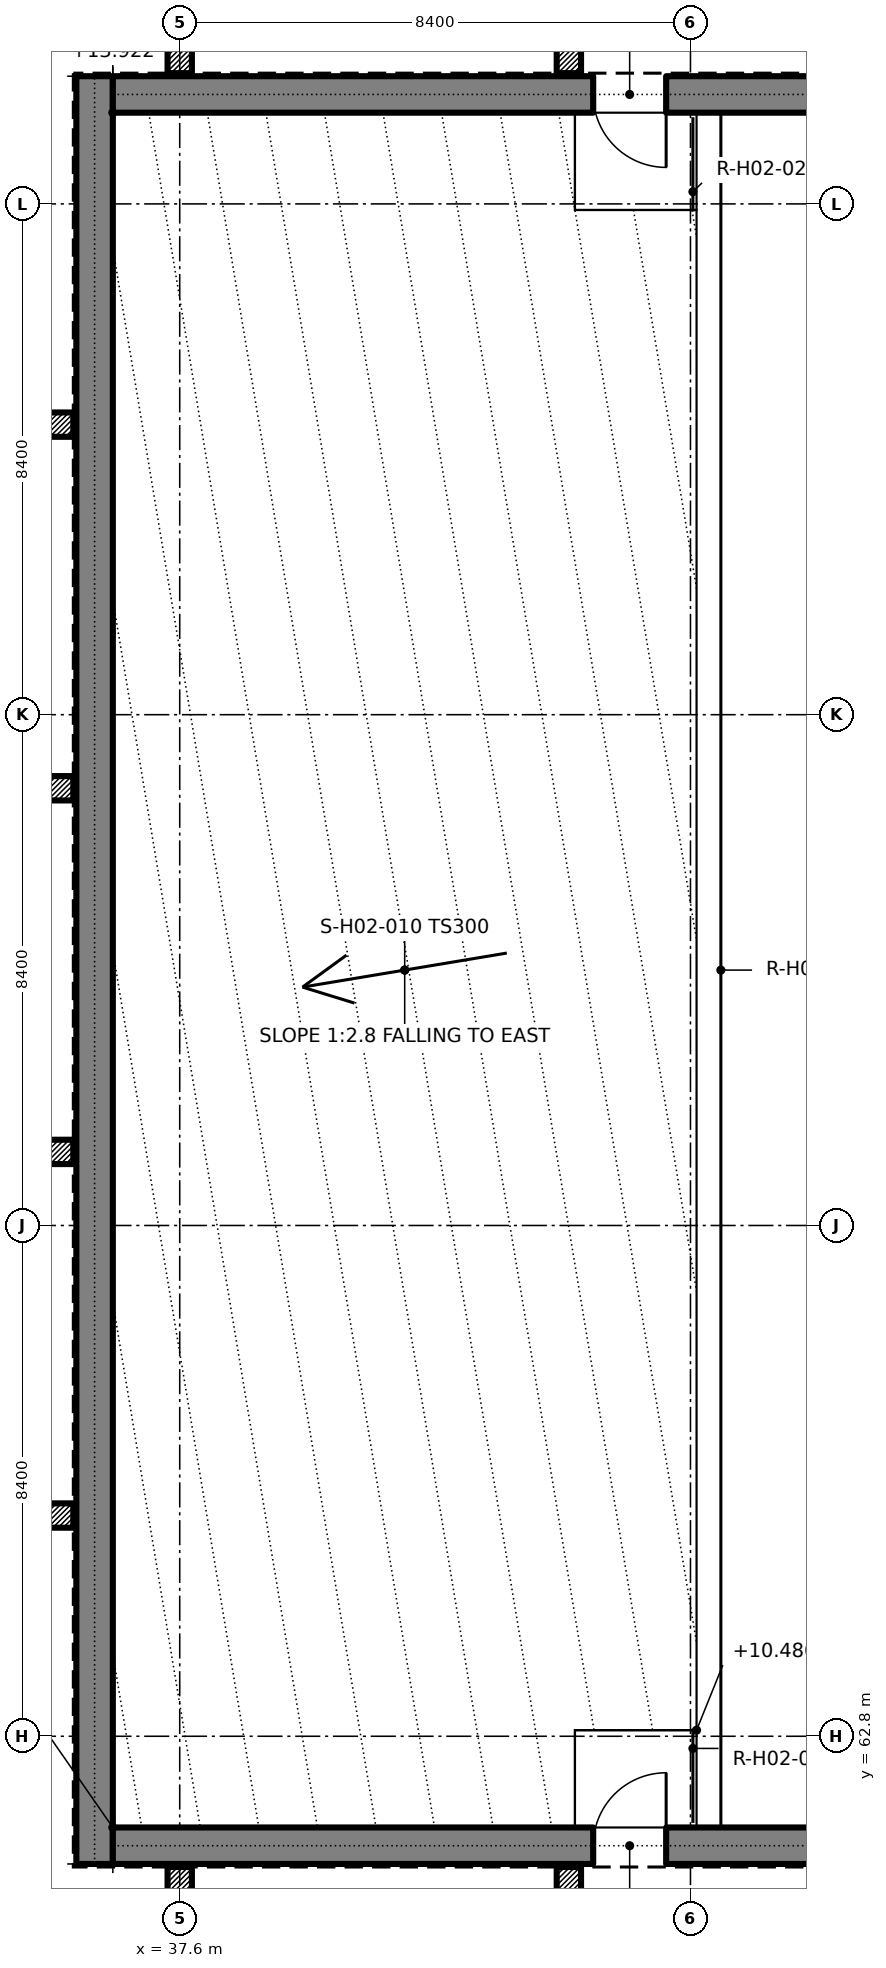
"""IFC4 building model, lengths in metres.
Left out: names, types, materials, properties, quantities, classifications, styles, units other than length and angle.
Written with IfcOpenShell. Run it as: python <this file> out.ifc"""

import sys

from ifc_helpers import new_model, si_unit, direction, frame, frame_2d, origin, origin_2d, place, context, subcontext, project, spatial, rectangle, extrude, element, fill, save


model = new_model("IFC4")
c1 = context("Model", 3, precision=1e-05, world=origin(), true_north=direction((0.0, 1.0)))
c2 = subcontext(c1, "Body", "Model", "MODEL_VIEW")
j1 = project(units=[si_unit("LENGTHUNIT", "METRE"), si_unit("PLANEANGLEUNIT", "RADIAN")], contexts=[c1])
p1 = place(None, origin())
s1 = spatial("IfcSite", under=j1, at=p1, CompositionType="ELEMENT")
p2 = place(p1, origin())
s2 = spatial("IfcBuilding", under=s1, at=p2, CompositionType="ELEMENT")
p3 = place(p2, frame((0.0, 0.0, 10.2)))
s3 = spatial("IfcBuildingStorey", under=s2, at=p3, CompositionType="ELEMENT", Elevation=10.2)
p4 = place(p3, frame((36.2, 60.7, 0.0), z_axis=(0.0, 0.0, 1.0), x_axis=(0.0, 1.0, 0.0)))
e1 = element("IfcWall", 1, at=p4, inside=s3, PredefinedType="SOLIDWALL", context=c2, shape_type="SweptSolid", body=[
    extrude(rectangle(XDim=29.4, YDim=0.6, at=frame_2d((14.7, 0.0))), origin(), (0.0, 0.0, 1.0), 4.8),
])
p5 = place(p3, frame((36.5, 61.0, 0.0), z_axis=(0.0, 0.0, 1.0), x_axis=(1.0, 0.0, 0.0)))
e2 = element("IfcWall", 2, at=p5, inside=s3, PredefinedType="SOLIDWALL", context=c2, shape_type="SweptSolid", body=[
    extrude(rectangle(XDim=52.6, YDim=0.6, at=frame_2d((26.3, 0.0))), origin(), (0.0, 0.0, 1.0), 4.8),
])
p6 = place(p5, frame((7.9, 0.0, 0.0)))
e3 = element("IfcOpeningElement", 3, at=p6, cuts=e2, PredefinedType="OPENING", context=c2, shape_type="SweptSolid", body=[
    extrude(rectangle(XDim=1.2, YDim=2.1, at=frame_2d((0.6, 1.05))), frame((0.0, 0.31, 0.0), z_axis=(0.0, -1.0, 0.0), x_axis=(1.0, 0.0, 0.0)), (0.0, 0.0, 1.0), 0.62),
])
p7 = place(p5, frame((15.4, 0.0, 0.0)))
e4 = element("IfcOpeningElement", 4, at=p7, cuts=e2, PredefinedType="OPENING", context=c2, shape_type="SweptSolid", body=[
    extrude(rectangle(XDim=1.2, YDim=2.1, at=frame_2d((0.6, 1.05))), frame((0.0, 0.31, 0.0), z_axis=(0.0, -1.0, 0.0), x_axis=(1.0, 0.0, 0.0)), (0.0, 0.0, 1.0), 0.62),
])
p8 = place(p5, frame((32.4, 0.0, 0.0)))
e5 = element("IfcOpeningElement", 5, at=p8, cuts=e2, PredefinedType="OPENING", context=c2, shape_type="SweptSolid", body=[
    extrude(rectangle(XDim=1.2, YDim=2.1, at=frame_2d((0.6, 1.05))), frame((0.0, 0.31, 0.0), z_axis=(0.0, -1.0, 0.0), x_axis=(1.0, 0.0, 0.0)), (0.0, 0.0, 1.0), 0.62),
])
p9 = place(p3, frame((36.5, 89.8, 0.0), z_axis=(0.0, 0.0, 1.0), x_axis=(1.0, 0.0, 0.0)))
e6 = element("IfcWall", 6, at=p9, inside=s3, PredefinedType="SOLIDWALL", context=c2, shape_type="SweptSolid", body=[
    extrude(rectangle(XDim=52.6, YDim=0.6, at=frame_2d((26.3, 0.0))), origin(), (0.0, 0.0, 1.0), 4.8),
])
p10 = place(p9, frame((7.9, 0.0, 0.0)))
e7 = element("IfcOpeningElement", 7, at=p10, cuts=e6, PredefinedType="OPENING", context=c2, shape_type="SweptSolid", body=[
    extrude(rectangle(XDim=1.2, YDim=2.1, at=frame_2d((0.6, 1.05))), frame((0.0, 0.31, 0.0), z_axis=(0.0, -1.0, 0.0), x_axis=(1.0, 0.0, 0.0)), (0.0, 0.0, 1.0), 0.62),
])
p11 = place(p9, frame((15.4, 0.0, 0.0)))
e8 = element("IfcOpeningElement", 8, at=p11, cuts=e6, PredefinedType="OPENING", context=c2, shape_type="SweptSolid", body=[
    extrude(rectangle(XDim=1.2, YDim=2.1, at=frame_2d((0.6, 1.05))), frame((0.0, 0.31, 0.0), z_axis=(0.0, -1.0, 0.0), x_axis=(1.0, 0.0, 0.0)), (0.0, 0.0, 1.0), 0.62),
])
p12 = place(p9, frame((32.4, 0.0, 0.0)))
e9 = element("IfcOpeningElement", 9, at=p12, cuts=e6, PredefinedType="OPENING", context=c2, shape_type="SweptSolid", body=[
    extrude(rectangle(XDim=1.2, YDim=2.1, at=frame_2d((0.6, 1.05))), frame((0.0, 0.31, 0.0), z_axis=(0.0, -1.0, 0.0), x_axis=(1.0, 0.0, 0.0)), (0.0, 0.0, 1.0), 0.62),
])
for number, where, z_axis, x_axis in (
    (10, (37.6, 60.45, 0.0), (0.0, 0.0, 1.0), (1.0, 0.0, 0.0)),
    (11, (44.0, 60.45, 0.0), (0.0, 0.0, 1.0), (1.0, 0.0, 0.0)),
    (12, (37.6, 90.35, 0.0), (0.0, 0.0, 1.0), (1.0, 0.0, 0.0)),
    (13, (44.0, 90.35, 0.0), (0.0, 0.0, 1.0), (1.0, 0.0, 0.0)),
    (14, (35.65, 66.43, 0.0), (0.0, 0.0, 1.0), (1.0, 0.0, 0.0)),
    (15, (35.65, 72.41, 0.0), (0.0, 0.0, 1.0), (1.0, 0.0, 0.0)),
    (16, (35.65, 78.39, 0.0), (0.0, 0.0, 1.0), (1.0, 0.0, 0.0)),
    (17, (35.65, 84.37, 0.0), (0.0, 0.0, 1.0), (1.0, 0.0, 0.0)),
):
    element("IfcColumn", number, at=place(p3, frame(where, z_axis=z_axis, x_axis=x_axis)), inside=s3, PredefinedType="COLUMN", context=c2, shape_type="SweptSolid", body=[
        extrude(rectangle(XDim=0.4, YDim=0.4, at=origin_2d()), origin(), (0.0, 0.0, 1.0), 4.8),
    ])
p13 = place(p6, origin())
e18 = element("IfcDoor", 18, at=p13, inside=s3, OperationType="SINGLE_SWING_RIGHT", PredefinedType="DOOR", context=c2, shape_type="SweptSolid", body=[
    extrude(rectangle(XDim=1.2, YDim=2.1, at=frame_2d((0.6, 1.05))), frame((0.0, 0.025, 0.0), z_axis=(0.0, -1.0, 0.0), x_axis=(1.0, 0.0, 0.0)), (0.0, 0.0, 1.0), 0.05),
])
fill(e3, e18)
p14 = place(p10, frame((1.2, 0.0, 0.0), z_axis=(0.0, 0.0, 1.0), x_axis=(-1.0, 0.0, 0.0)))
e19 = element("IfcDoor", 19, at=p14, inside=s3, OperationType="SINGLE_SWING_LEFT", PredefinedType="DOOR", context=c2, shape_type="SweptSolid", body=[
    extrude(rectangle(XDim=1.2, YDim=2.1, at=frame_2d((0.6, 1.05))), frame((0.0, 0.025, 0.0), z_axis=(0.0, -1.0, 0.0), x_axis=(1.0, 0.0, 0.0)), (0.0, 0.0, 1.0), 0.05),
])
fill(e7, e19)
save(model, sys.argv[1])
